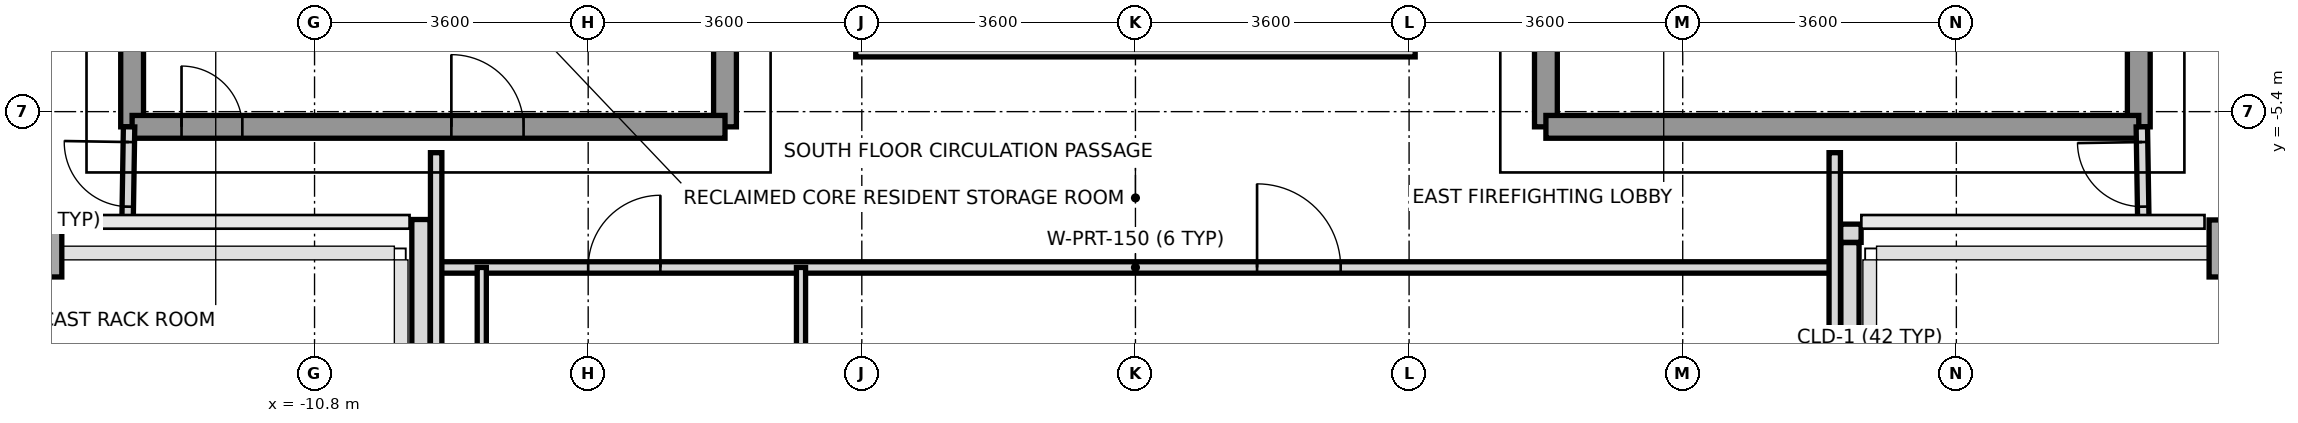
"""IFC4 building model, lengths in metres.
Left out: names, types, materials, properties, quantities, classifications, styles, units other than length and angle.
Written with IfcOpenShell. Run it as: python <this file> out.ifc"""

import sys

from ifc_helpers import new_model, si_unit, direction, frame, frame_2d, origin, origin_2d, place, context, subcontext, project, spatial, rectangle, extrude, source, transform, mapped, element, fill, save


model = new_model("IFC4")
c1 = context("Model", 3, precision=1e-05, world=origin(), true_north=direction((0.0, 1.0)))
c2 = subcontext(c1, "Body", "Model", "MODEL_VIEW")
j1 = project(units=[si_unit("LENGTHUNIT", "METRE"), si_unit("PLANEANGLEUNIT", "RADIAN")], contexts=[c1])
p1 = place(None, origin())
s1 = spatial("IfcSite", under=j1, at=p1, CompositionType="ELEMENT")
p2 = place(p1, origin())
s2 = spatial("IfcBuilding", under=s1, at=p2, CompositionType="ELEMENT")
p3 = place(p2, frame((0.0, 0.0, 246.0)))
s3 = spatial("IfcBuildingStorey", under=s2, at=p3, CompositionType="ELEMENT", Elevation=246.0)
m1 = source(origin(), c2, "Body", "SweptSolid", [
    extrude(rectangle(XDim=0.55, YDim=0.75, at=origin_2d()), origin(), (0.0, 0.0, 1.0), 3.01),
])
for number, where, z_axis, x_axis in (
    (1, (-14.4, -7.2, 0.0), (0.0, 0.0, 1.0), (1.0, 0.0, 0.0)),
    (2, (14.4, -7.2, 0.0), (0.0, 0.0, 1.0), (1.0, 0.0, 0.0)),
):
    element("IfcColumn", number, at=place(p3, frame(where, z_axis=z_axis, x_axis=x_axis)), inside=s3, PredefinedType="COLUMN", context=c2, shape_type="MappedRepresentation", body=[
        mapped(m1, transform((0.0, 0.0, 0.0), x_axis=(1.0, 0.0, 0.0), y_axis=(0.0, 1.0, 0.0), z_axis=(0.0, 0.0, 1.0), scale=1.0)),
    ])
p4 = place(p3, frame((9.547, -7.0, 0.0), z_axis=(0.0, 0.0, 1.0), x_axis=(-1.0, 0.0, 0.0)))
e3 = element("IfcWall", 3, at=p4, inside=s3, PredefinedType="PARAPET", context=c2, shape_type="SweptSolid", body=[
    extrude(rectangle(XDim=0.269, YDim=0.24, at=frame_2d((0.135, 0.0))), origin(), (0.0, 0.0, 1.0), 1.15),
])
p5 = place(p3, frame((9.4, -7.123, 0.0), z_axis=(0.0, 0.0, 1.0), x_axis=(0.0, -1.0, 0.0)))
e4 = element("IfcWall", 4, at=p5, inside=s3, PredefinedType="PARAPET", context=c2, shape_type="SweptSolid", body=[
    extrude(rectangle(XDim=1.499, YDim=0.24, at=frame_2d((0.75, 0.0))), origin(), (0.0, 0.0, 1.0), 1.15),
])
p6 = place(p3, frame((-9.4, -8.622, 0.0), z_axis=(0.0, 0.0, 1.0), x_axis=(0.0, 1.0, 0.0)))
e5 = element("IfcWall", 5, at=p6, inside=s3, PredefinedType="PARAPET", context=c2, shape_type="SweptSolid", body=[
    extrude(rectangle(XDim=1.803, YDim=0.24, at=frame_2d((0.901, 0.0))), origin(), (0.0, 0.0, 1.0), 1.15),
])
p7 = place(p3, frame((-13.2, -5.6, 0.0), z_axis=(0.0, 0.0, 1.0), x_axis=(0.0, 1.0, 0.0)))
e6 = element("IfcWall", 6, at=p7, inside=s3, PredefinedType="SHEAR", context=c2, shape_type="SweptSolid", body=[
    extrude(rectangle(XDim=11.2, YDim=0.3, at=frame_2d((5.6, 0.0))), origin(), (0.0, 0.0, 1.0), 3.01),
])
p8 = place(p3, frame((-5.4, -5.6, 0.0), z_axis=(0.0, 0.0, 1.0), x_axis=(0.0, 1.0, 0.0)))
e7 = element("IfcWall", 7, at=p8, inside=s3, PredefinedType="SHEAR", context=c2, shape_type="SweptSolid", body=[
    extrude(rectangle(XDim=12.5, YDim=0.3, at=frame_2d((6.25, 0.0))), origin(), (0.0, 0.0, 1.0), 3.01),
])
p9 = place(p8, frame((4.55, 0.0, 0.0)))
e8 = element("IfcOpeningElement", 8, at=p9, cuts=e7, PredefinedType="OPENING", context=c2, shape_type="SweptSolid", body=[
    extrude(rectangle(XDim=1.2, YDim=2.2, at=frame_2d((0.6, 1.1))), frame((0.0, 0.16, 0.0), z_axis=(0.0, -1.0, 0.0), x_axis=(1.0, 0.0, 0.0)), (0.0, 0.0, 1.0), 0.32),
])
p10 = place(p8, frame((10.45, 0.0, 0.0)))
e9 = element("IfcOpeningElement", 9, at=p10, cuts=e7, PredefinedType="OPENING", context=c2, shape_type="SweptSolid", body=[
    extrude(rectangle(XDim=1.2, YDim=2.2, at=frame_2d((0.6, 1.1))), frame((0.0, 0.16, 0.0), z_axis=(0.0, -1.0, 0.0), x_axis=(1.0, 0.0, 0.0)), (0.0, 0.0, 1.0), 0.32),
])
p11 = place(p8, frame((6.86, 0.0, 0.0)))
e10 = element("IfcOpeningElement", 10, at=p11, cuts=e7, PredefinedType="OPENING", context=c2, shape_type="SweptSolid", body=[
    extrude(rectangle(XDim=0.8, YDim=2.1, at=frame_2d((0.4, 1.05))), frame((0.0, 0.16, 0.0), z_axis=(0.0, -1.0, 0.0), x_axis=(1.0, 0.0, 0.0)), (0.0, 0.0, 1.0), 0.32),
])
p12 = place(p3, frame((-13.2, -5.6, 0.0), z_axis=(0.0, 0.0, 1.0), x_axis=(1.0, 0.0, 0.0)))
e11 = element("IfcWall", 11, at=p12, inside=s3, PredefinedType="SHEAR", context=c2, shape_type="SweptSolid", body=[
    extrude(rectangle(XDim=7.8, YDim=0.3, at=frame_2d((3.9, 0.0))), origin(), (0.0, 0.0, 1.0), 3.01),
])
p13 = place(p12, frame((0.65, 0.0, 0.0)))
e12 = element("IfcOpeningElement", 12, at=p13, cuts=e11, PredefinedType="OPENING", context=c2, shape_type="SweptSolid", body=[
    extrude(rectangle(XDim=0.8, YDim=2.1, at=frame_2d((0.4, 1.05))), frame((0.0, 0.16, 0.0), z_axis=(0.0, -1.0, 0.0), x_axis=(1.0, 0.0, 0.0)), (0.0, 0.0, 1.0), 0.32),
])
p14 = place(p12, frame((4.2, 0.0, 0.0)))
e13 = element("IfcOpeningElement", 13, at=p14, cuts=e11, PredefinedType="OPENING", context=c2, shape_type="SweptSolid", body=[
    extrude(rectangle(XDim=0.95, YDim=2.15, at=frame_2d((0.475, 1.075))), frame((0.0, 0.16, 0.0), z_axis=(0.0, -1.0, 0.0), x_axis=(1.0, 0.0, 0.0)), (0.0, 0.0, 1.0), 0.32),
])
p15 = place(p3, frame((13.2, -5.6, 0.0), z_axis=(0.0, 0.0, 1.0), x_axis=(0.0, 1.0, 0.0)))
e14 = element("IfcWall", 14, at=p15, inside=s3, PredefinedType="SHEAR", context=c2, shape_type="SweptSolid", body=[
    extrude(rectangle(XDim=11.2, YDim=0.3, at=frame_2d((5.6, 0.0))), origin(), (0.0, 0.0, 1.0), 3.01),
])
p16 = place(p3, frame((5.4, -5.6, 0.0), z_axis=(0.0, 0.0, 1.0), x_axis=(0.0, 1.0, 0.0)))
e15 = element("IfcWall", 15, at=p16, inside=s3, PredefinedType="SHEAR", context=c2, shape_type="SweptSolid", body=[
    extrude(rectangle(XDim=12.5, YDim=0.3, at=frame_2d((6.25, 0.0))), origin(), (0.0, 0.0, 1.0), 3.01),
])
p17 = place(p16, frame((4.55, 0.0, 0.0)))
e16 = element("IfcOpeningElement", 16, at=p17, cuts=e15, PredefinedType="OPENING", context=c2, shape_type="SweptSolid", body=[
    extrude(rectangle(XDim=1.2, YDim=2.2, at=frame_2d((0.6, 1.1))), frame((0.0, 0.16, 0.0), z_axis=(0.0, -1.0, 0.0), x_axis=(1.0, 0.0, 0.0)), (0.0, 0.0, 1.0), 0.32),
])
p18 = place(p16, frame((10.45, 0.0, 0.0)))
e17 = element("IfcOpeningElement", 17, at=p18, cuts=e15, PredefinedType="OPENING", context=c2, shape_type="SweptSolid", body=[
    extrude(rectangle(XDim=1.2, YDim=2.2, at=frame_2d((0.6, 1.1))), frame((0.0, 0.16, 0.0), z_axis=(0.0, -1.0, 0.0), x_axis=(1.0, 0.0, 0.0)), (0.0, 0.0, 1.0), 0.32),
])
p19 = place(p16, frame((6.86, 0.0, 0.0)))
e18 = element("IfcOpeningElement", 18, at=p19, cuts=e15, PredefinedType="OPENING", context=c2, shape_type="SweptSolid", body=[
    extrude(rectangle(XDim=0.8, YDim=2.1, at=frame_2d((0.4, 1.05))), frame((0.0, 0.16, 0.0), z_axis=(0.0, -1.0, 0.0), x_axis=(1.0, 0.0, 0.0)), (0.0, 0.0, 1.0), 0.32),
])
p20 = place(p3, frame((5.4, -5.6, 0.0), z_axis=(0.0, 0.0, 1.0), x_axis=(1.0, 0.0, 0.0)))
e19 = element("IfcWall", 19, at=p20, inside=s3, PredefinedType="SHEAR", context=c2, shape_type="SweptSolid", body=[
    extrude(rectangle(XDim=7.8, YDim=0.3, at=frame_2d((3.9, 0.0))), origin(), (0.0, 0.0, 1.0), 3.01),
])
p21 = place(p3, frame((-9.2, -7.45, 0.0), z_axis=(0.0, 0.0, 1.0), x_axis=(1.0, 0.0, 0.0)))
e20 = element("IfcWall", 20, at=p21, inside=s3, PredefinedType="PARTITIONING", context=c2, shape_type="SweptSolid", body=[
    extrude(rectangle(XDim=18.4, YDim=0.15, at=frame_2d((9.2, 0.0))), origin(), (0.0, 0.0, 1.0), 2.57),
])
p22 = place(p21, frame((2.0, 0.0, 0.0)))
e21 = element("IfcOpeningElement", 21, at=p22, cuts=e20, PredefinedType="OPENING", context=c2, shape_type="SweptSolid", body=[
    extrude(rectangle(XDim=0.95, YDim=2.15, at=frame_2d((0.475, 1.075))), frame((0.0, 0.085, 0.0), z_axis=(0.0, -1.0, 0.0), x_axis=(1.0, 0.0, 0.0)), (0.0, 0.0, 1.0), 0.17),
])
p23 = place(p21, frame((10.8, 0.0, 0.0)))
e22 = element("IfcOpeningElement", 22, at=p23, cuts=e20, PredefinedType="OPENING", context=c2, shape_type="SweptSolid", body=[
    extrude(rectangle(XDim=1.1, YDim=2.2, at=frame_2d((0.55, 1.1))), frame((0.0, 0.085, 0.0), z_axis=(0.0, -1.0, 0.0), x_axis=(1.0, 0.0, 0.0)), (0.0, 0.0, 1.0), 0.17),
])
for number, where, z_axis, x_axis in (
    (23, (-9.2, -10.28, 0.0), (0.0, 0.0, 1.0), (0.0, 1.0, 0.0)),
    (24, (9.2, -10.28, 0.0), (0.0, 0.0, 1.0), (0.0, 1.0, 0.0)),
):
    element("IfcWall", number, at=place(p3, frame(where, z_axis=z_axis, x_axis=x_axis)), inside=s3, PredefinedType="PARTITIONING", context=c2, shape_type="SweptSolid", body=[
        extrude(rectangle(XDim=4.34, YDim=0.15, at=frame_2d((2.17, 0.0))), origin(), (0.0, 0.0, 1.0), 2.61),
    ])
for number, where, z_axis, x_axis in (
    (25, (-8.6, -11.05, 0.0), (0.0, 0.0, 1.0), (0.0, 1.0, 0.0)),
    (26, (-4.4, -11.05, 0.0), (0.0, 0.0, 1.0), (0.0, 1.0, 0.0)),
):
    element("IfcWall", number, at=place(p3, frame(where, z_axis=z_axis, x_axis=x_axis)), inside=s3, PredefinedType="PARTITIONING", context=c2, shape_type="SweptSolid", body=[
        extrude(rectangle(XDim=3.6, YDim=0.12, at=frame_2d((1.8, 0.0))), origin(), (0.0, 0.0, 1.0), 2.61),
    ])
p24 = place(p3, frame((-13.26, -6.85, 0.0), z_axis=(0.0, 0.0, 1.0), x_axis=(0.016013571389, 0.999871774545, 0.0)))
e27 = element("IfcWall", 27, at=p24, inside=s3, PredefinedType="PARTITIONING", context=c2, shape_type="SweptSolid", body=[
    extrude(rectangle(XDim=1.25, YDim=0.15, at=frame_2d((0.625, 0.0))), origin(), (0.0, 0.0, 1.0), 3.01),
])
p25 = place(p24, frame((0.2, 0.0, 0.0)))
e28 = element("IfcOpeningElement", 28, at=p25, cuts=e27, PredefinedType="OPENING", context=c2, shape_type="SweptSolid", body=[
    extrude(rectangle(XDim=0.85, YDim=2.1, at=frame_2d((0.425, 1.05))), frame((0.0, 0.085, 0.0), z_axis=(0.0, -1.0, 0.0), x_axis=(1.0, 0.0, 0.0)), (0.0, 0.0, 1.0), 0.17),
])
p26 = place(p3, frame((13.26, -6.85, 0.0), z_axis=(0.0, 0.0, 1.0), x_axis=(-0.016013571389, 0.999871774545, 0.0)))
e29 = element("IfcWall", 29, at=p26, inside=s3, PredefinedType="PARTITIONING", context=c2, shape_type="SweptSolid", body=[
    extrude(rectangle(XDim=1.25, YDim=0.15, at=frame_2d((0.625, 0.0))), origin(), (0.0, 0.0, 1.0), 3.01),
])
p27 = place(p26, frame((0.2, 0.0, 0.0)))
e30 = element("IfcOpeningElement", 30, at=p27, cuts=e29, PredefinedType="OPENING", context=c2, shape_type="SweptSolid", body=[
    extrude(rectangle(XDim=0.85, YDim=2.1, at=frame_2d((0.425, 1.05))), frame((0.0, 0.085, 0.0), z_axis=(0.0, -1.0, 0.0), x_axis=(1.0, 0.0, 0.0)), (0.0, 0.0, 1.0), 0.17),
])
p28 = place(p3, frame((-3.68, -4.56, 0.0), z_axis=(0.0, 0.0, 1.0), x_axis=(1.0, 0.0, 0.0)))
e31 = element("IfcWall", 31, at=p28, inside=s3, PredefinedType="PARAPET", context=c2, shape_type="SweptSolid", body=[
    extrude(rectangle(XDim=7.36, YDim=0.24, at=frame_2d((3.68, 0.0))), origin(), (0.0, 0.0, 1.0), 1.15),
])
m2 = source(origin(), c2, "Body", "SweptSolid", [
    extrude(rectangle(XDim=0.8, YDim=2.1, at=frame_2d((0.4, 1.05))), frame((0.0, 0.025, 0.0), z_axis=(0.0, -1.0, 0.0), x_axis=(1.0, 0.0, 0.0)), (0.0, 0.0, 1.0), 0.05),
])
p29 = place(p13, origin())
e32 = element("IfcDoor", 32, at=p29, inside=s3, OperationType="SINGLE_SWING_LEFT", PredefinedType="DOOR", context=c2, shape_type="MappedRepresentation", body=[
    mapped(m2, transform((0.0, 0.0, 0.0), x_axis=(1.0, 0.0, 0.0), y_axis=(0.0, 1.0, 0.0), z_axis=(0.0, 0.0, 1.0), scale=1.0)),
])
fill(e12, e32)
m3 = source(origin(), c2, "Body", "SweptSolid", [
    extrude(rectangle(XDim=0.95, YDim=2.15, at=frame_2d((0.475, 1.075))), frame((0.0, 0.025, 0.0), z_axis=(0.0, -1.0, 0.0), x_axis=(1.0, 0.0, 0.0)), (0.0, 0.0, 1.0), 0.05),
])
p30 = place(p14, origin())
e33 = element("IfcDoor", 33, at=p30, inside=s3, OperationType="SINGLE_SWING_LEFT", PredefinedType="DOOR", context=c2, shape_type="MappedRepresentation", body=[
    mapped(m3, transform((0.0, 0.0, 0.0), x_axis=(1.0, 0.0, 0.0), y_axis=(0.0, 1.0, 0.0), z_axis=(0.0, 0.0, 1.0), scale=1.0)),
])
fill(e13, e33)
p31 = place(p22, origin())
e34 = element("IfcDoor", 34, at=p31, inside=s3, OperationType="SINGLE_SWING_RIGHT", PredefinedType="DOOR", context=c2, shape_type="MappedRepresentation", body=[
    mapped(m3, transform((0.0, 0.0, 0.0), x_axis=(1.0, 0.0, 0.0), y_axis=(0.0, 1.0, 0.0), z_axis=(0.0, 0.0, 1.0), scale=1.0)),
])
fill(e21, e34)
m4 = source(origin(), c2, "Body", "SweptSolid", [
    extrude(rectangle(XDim=1.1, YDim=2.2, at=frame_2d((0.55, 1.1))), frame((0.0, 0.025, 0.0), z_axis=(0.0, -1.0, 0.0), x_axis=(1.0, 0.0, 0.0)), (0.0, 0.0, 1.0), 0.05),
])
p32 = place(p23, origin())
e35 = element("IfcDoor", 35, at=p32, inside=s3, OperationType="SINGLE_SWING_LEFT", PredefinedType="DOOR", context=c2, shape_type="MappedRepresentation", body=[
    mapped(m4, transform((0.0, 0.0, 0.0), x_axis=(1.0, 0.0, 0.0), y_axis=(0.0, 1.0, 0.0), z_axis=(0.0, 0.0, 1.0), scale=1.0)),
])
fill(e22, e35)
m5 = source(origin(), c2, "Body", "SweptSolid", [
    extrude(rectangle(XDim=0.85, YDim=2.1, at=frame_2d((0.425, 1.05))), frame((0.0, 0.025, 0.0), z_axis=(0.0, -1.0, 0.0), x_axis=(1.0, 0.0, 0.0)), (0.0, 0.0, 1.0), 0.05),
])
p33 = place(p25, origin())
e36 = element("IfcDoor", 36, at=p33, inside=s3, OperationType="SINGLE_SWING_RIGHT", PredefinedType="DOOR", context=c2, shape_type="MappedRepresentation", body=[
    mapped(m5, transform((0.0, 0.0, 0.0), x_axis=(1.0, 0.0, 0.0), y_axis=(0.0, 1.0, 0.0), z_axis=(0.0, 0.0, 1.0), scale=1.0)),
])
fill(e28, e36)
p34 = place(p27, origin())
e37 = element("IfcDoor", 37, at=p34, inside=s3, OperationType="SINGLE_SWING_RIGHT", PredefinedType="DOOR", context=c2, shape_type="MappedRepresentation", body=[
    mapped(m5, transform((0.0, 0.0, 0.0), x_axis=(1.0, 0.0, 0.0), y_axis=(0.0, 1.0, 0.0), z_axis=(0.0, 0.0, 1.0), scale=1.0)),
])
fill(e30, e37)
save(model, sys.argv[1])
